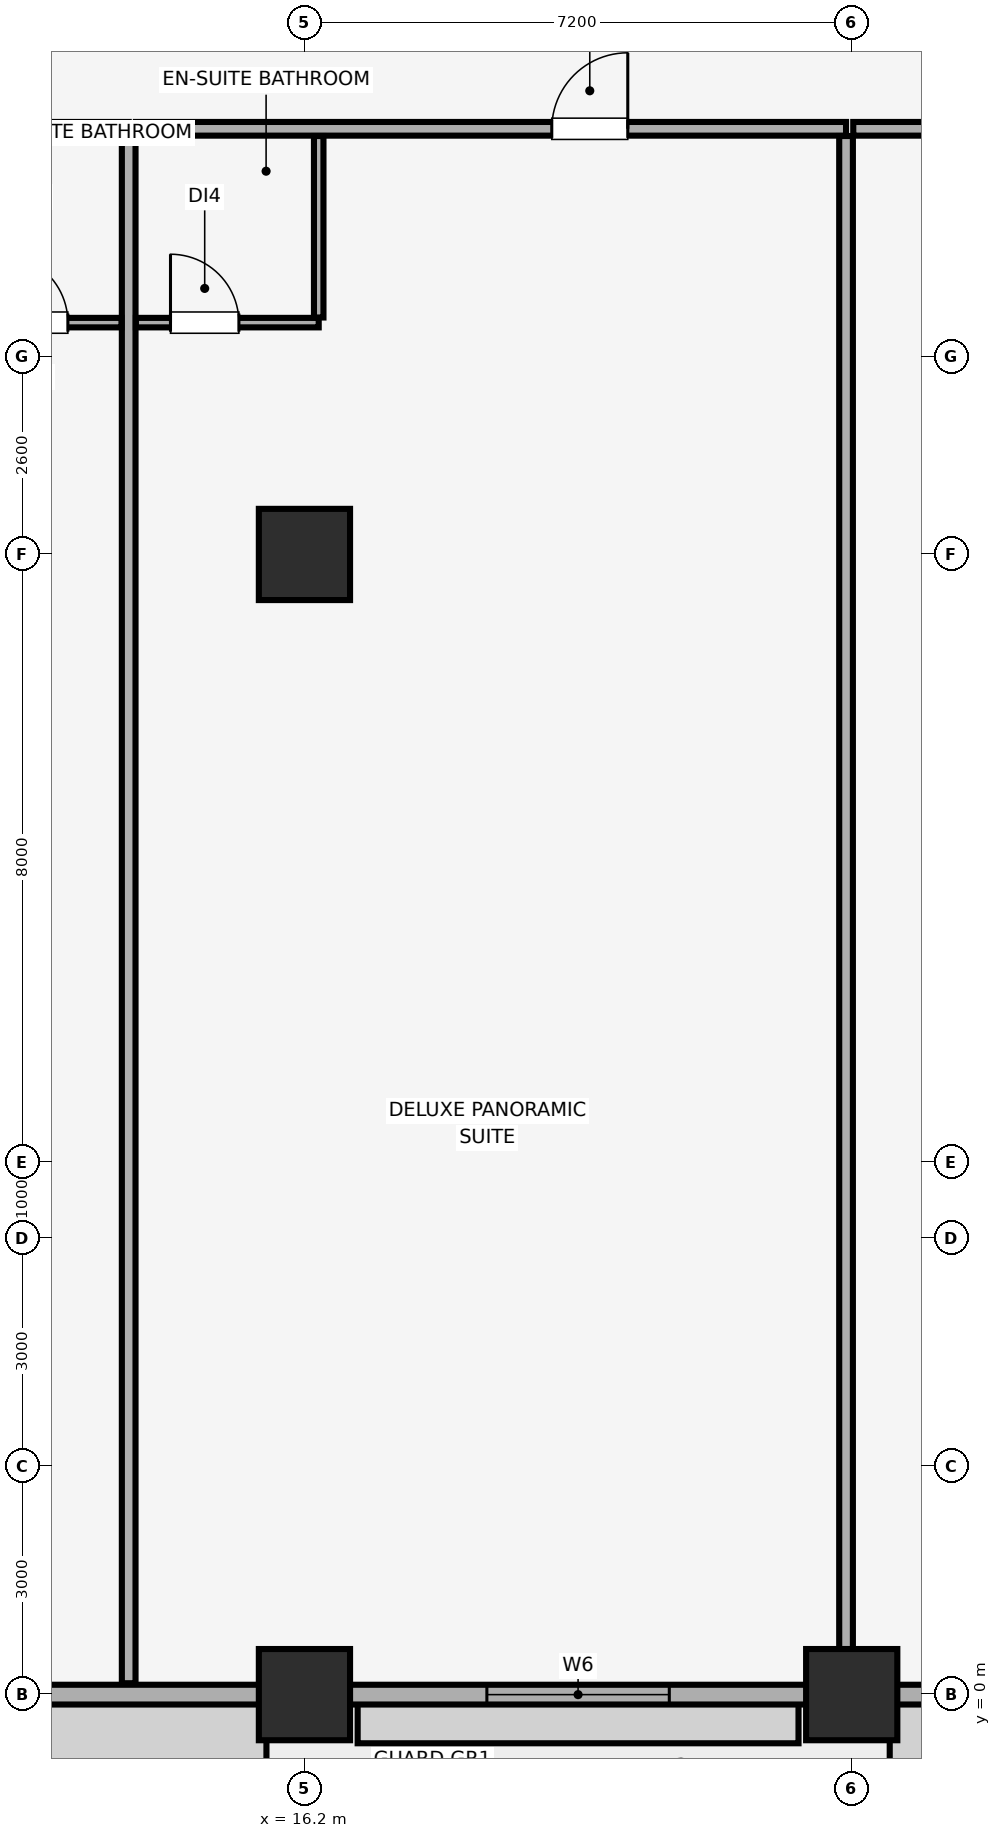
"""IFC4 building model, lengths in metres.
Left out: names, types, materials, properties, quantities, classifications, styles, units other than length and angle.
Written with IfcOpenShell. Run it as: python <this file> out.ifc"""

import sys

from ifc_helpers import new_model, si_unit, direction, frame, frame_2d, origin, origin_2d, place, context, subcontext, project, spatial, rectangle, extrude, element, fill, save


model = new_model("IFC4")
c1 = context("Model", 3, precision=1e-05, world=origin(), true_north=direction((0.0, 1.0)))
c2 = subcontext(c1, "Body", "Model", "MODEL_VIEW")
j1 = project(units=[si_unit("LENGTHUNIT", "METRE"), si_unit("PLANEANGLEUNIT", "RADIAN")], contexts=[c1])
p1 = place(None, origin())
s1 = spatial("IfcSite", under=j1, at=p1, CompositionType="ELEMENT")
p2 = place(p1, origin())
s2 = spatial("IfcBuilding", under=s1, at=p2, CompositionType="ELEMENT")
p3 = place(p2, frame((0.0, 0.0, 93.05)))
s3 = spatial("IfcBuildingStorey", under=s2, at=p3, CompositionType="ELEMENT", Elevation=93.05)
for number, where, z_axis, x_axis in (
    (1, (16.2, 0.0, 0.0), (0.0, 0.0, 1.0), (1.0, 0.0, 0.0)),
    (2, (23.4, 0.0, 0.0), (0.0, 0.0, 1.0), (1.0, 0.0, 0.0)),
    (3, (16.2, 15.0, 0.0), (0.0, 0.0, 1.0), (1.0, 0.0, 0.0)),
):
    element("IfcColumn", number, at=place(p3, frame(where, z_axis=z_axis, x_axis=x_axis)), inside=s3, PredefinedType="COLUMN", context=c2, shape_type="SweptSolid", body=[
        extrude(rectangle(XDim=1.2, YDim=1.2, at=origin_2d()), origin(), (0.0, 0.0, 1.0), 3.51),
    ])
p4 = place(p3, frame((4.2, 0.0, 0.0), z_axis=(0.0, 0.0, 1.0), x_axis=(1.0, 0.0, 0.0)))
e4 = element("IfcWall", 4, at=p4, inside=s3, PredefinedType="SOLIDWALL", context=c2, shape_type="SweptSolid", body=[
    extrude(rectangle(XDim=75.6, YDim=0.26, at=frame_2d((37.8, 0.0))), origin(), (0.0, 0.0, 1.0), 2.56),
])
p5 = place(p4, frame((21.383, 0.0, 0.0)))
e5 = element("IfcOpeningElement", 5, at=p5, cuts=e4, PredefinedType="OPENING", context=c2, shape_type="SweptSolid", body=[
    extrude(rectangle(XDim=1.1, YDim=2.15, at=frame_2d((0.55, 1.075))), frame((0.0, 0.14, 0.0), z_axis=(0.0, -1.0, 0.0), x_axis=(1.0, 0.0, 0.0)), (0.0, 0.0, 1.0), 0.28),
])
p6 = place(p4, frame((36.05, 0.0, 0.0)))
e6 = element("IfcOpeningElement", 6, at=p6, cuts=e4, PredefinedType="OPENING", context=c2, shape_type="SweptSolid", body=[
    extrude(rectangle(XDim=1.1, YDim=2.15, at=frame_2d((0.55, 1.075))), frame((0.0, 0.14, 0.0), z_axis=(0.0, -1.0, 0.0), x_axis=(1.0, 0.0, 0.0)), (0.0, 0.0, 1.0), 0.28),
])
p7 = place(p4, frame((53.117, 0.0, 0.0)))
e7 = element("IfcOpeningElement", 7, at=p7, cuts=e4, PredefinedType="OPENING", context=c2, shape_type="SweptSolid", body=[
    extrude(rectangle(XDim=1.1, YDim=2.15, at=frame_2d((0.55, 1.075))), frame((0.0, 0.14, 0.0), z_axis=(0.0, -1.0, 0.0), x_axis=(1.0, 0.0, 0.0)), (0.0, 0.0, 1.0), 0.28),
])
p8 = place(p4, frame((1.035, 0.0, 0.85)))
e8 = element("IfcOpeningElement", 8, at=p8, cuts=e4, PredefinedType="OPENING", context=c2, shape_type="SweptSolid", body=[
    extrude(rectangle(XDim=2.4, YDim=1.5, at=frame_2d((1.2, 0.75))), frame((0.0, 0.14, 0.0), z_axis=(0.0, -1.0, 0.0), x_axis=(1.0, 0.0, 0.0)), (0.0, 0.0, 1.0), 0.28),
])
p9 = place(p4, frame((6.244, 0.0, 0.85)))
e9 = element("IfcOpeningElement", 9, at=p9, cuts=e4, PredefinedType="OPENING", context=c2, shape_type="SweptSolid", body=[
    extrude(rectangle(XDim=2.4, YDim=1.5, at=frame_2d((1.2, 0.75))), frame((0.0, 0.14, 0.0), z_axis=(0.0, -1.0, 0.0), x_axis=(1.0, 0.0, 0.0)), (0.0, 0.0, 1.0), 0.28),
])
p10 = place(p4, frame((14.4, 0.0, 0.85)))
e10 = element("IfcOpeningElement", 10, at=p10, cuts=e4, PredefinedType="OPENING", context=c2, shape_type="SweptSolid", body=[
    extrude(rectangle(XDim=2.4, YDim=1.5, at=frame_2d((1.2, 0.75))), frame((0.0, 0.14, 0.0), z_axis=(0.0, -1.0, 0.0), x_axis=(1.0, 0.0, 0.0)), (0.0, 0.0, 1.0), 0.28),
])
p11 = place(p4, frame((23.127, 0.0, 0.85)))
e11 = element("IfcOpeningElement", 11, at=p11, cuts=e4, PredefinedType="OPENING", context=c2, shape_type="SweptSolid", body=[
    extrude(rectangle(XDim=2.4, YDim=1.5, at=frame_2d((1.2, 0.75))), frame((0.0, 0.14, 0.0), z_axis=(0.0, -1.0, 0.0), x_axis=(1.0, 0.0, 0.0)), (0.0, 0.0, 1.0), 0.28),
])
p12 = place(p4, frame((29.681, 0.0, 0.85)))
e12 = element("IfcOpeningElement", 12, at=p12, cuts=e4, PredefinedType="OPENING", context=c2, shape_type="SweptSolid", body=[
    extrude(rectangle(XDim=2.4, YDim=1.5, at=frame_2d((1.2, 0.75))), frame((0.0, 0.14, 0.0), z_axis=(0.0, -1.0, 0.0), x_axis=(1.0, 0.0, 0.0)), (0.0, 0.0, 1.0), 0.28),
])
p13 = place(p4, frame((38.601, 0.0, 0.85)))
e13 = element("IfcOpeningElement", 13, at=p13, cuts=e4, PredefinedType="OPENING", context=c2, shape_type="SweptSolid", body=[
    extrude(rectangle(XDim=2.4, YDim=1.5, at=frame_2d((1.2, 0.75))), frame((0.0, 0.14, 0.0), z_axis=(0.0, -1.0, 0.0), x_axis=(1.0, 0.0, 0.0)), (0.0, 0.0, 1.0), 0.28),
])
p14 = place(p4, frame((43.719, 0.0, 0.85)))
e14 = element("IfcOpeningElement", 14, at=p14, cuts=e4, PredefinedType="OPENING", context=c2, shape_type="SweptSolid", body=[
    extrude(rectangle(XDim=2.4, YDim=1.5, at=frame_2d((1.2, 0.75))), frame((0.0, 0.14, 0.0), z_axis=(0.0, -1.0, 0.0), x_axis=(1.0, 0.0, 0.0)), (0.0, 0.0, 1.0), 0.28),
])
p15 = place(p4, frame((50.073, 0.0, 0.85)))
e15 = element("IfcOpeningElement", 15, at=p15, cuts=e4, PredefinedType="OPENING", context=c2, shape_type="SweptSolid", body=[
    extrude(rectangle(XDim=2.4, YDim=1.5, at=frame_2d((1.2, 0.75))), frame((0.0, 0.14, 0.0), z_axis=(0.0, -1.0, 0.0), x_axis=(1.0, 0.0, 0.0)), (0.0, 0.0, 1.0), 0.28),
])
p16 = place(p4, frame((58.838, 0.0, 0.85)))
e16 = element("IfcOpeningElement", 16, at=p16, cuts=e4, PredefinedType="OPENING", context=c2, shape_type="SweptSolid", body=[
    extrude(rectangle(XDim=2.4, YDim=1.5, at=frame_2d((1.2, 0.75))), frame((0.0, 0.14, 0.0), z_axis=(0.0, -1.0, 0.0), x_axis=(1.0, 0.0, 0.0)), (0.0, 0.0, 1.0), 0.28),
])
p17 = place(p4, frame((67.056, 0.0, 0.85)))
e17 = element("IfcOpeningElement", 17, at=p17, cuts=e4, PredefinedType="OPENING", context=c2, shape_type="SweptSolid", body=[
    extrude(rectangle(XDim=2.4, YDim=1.5, at=frame_2d((1.2, 0.75))), frame((0.0, 0.14, 0.0), z_axis=(0.0, -1.0, 0.0), x_axis=(1.0, 0.0, 0.0)), (0.0, 0.0, 1.0), 0.28),
])
p18 = place(p4, frame((72.165, 0.0, 0.85)))
e18 = element("IfcOpeningElement", 18, at=p18, cuts=e4, PredefinedType="OPENING", context=c2, shape_type="SweptSolid", body=[
    extrude(rectangle(XDim=2.4, YDim=1.5, at=frame_2d((1.2, 0.75))), frame((0.0, 0.14, 0.0), z_axis=(0.0, -1.0, 0.0), x_axis=(1.0, 0.0, 0.0)), (0.0, 0.0, 1.0), 0.28),
])
p19 = place(p3, frame((0.15, 20.6, 0.0), z_axis=(0.0, 0.0, 1.0), x_axis=(1.0, 0.0, 0.0)))
e19 = element("IfcWall", 19, at=p19, inside=s3, PredefinedType="PARTITIONING", context=c2, shape_type="SweptSolid", body=[
    extrude(rectangle(XDim=13.738, YDim=0.18, at=frame_2d((6.869, 0.0))), origin(), (0.0, 0.0, 1.0), 3.51),
])
p20 = place(p19, frame((5.685, 0.0, 0.0)))
e20 = element("IfcOpeningElement", 20, at=p20, cuts=e19, PredefinedType="OPENING", context=c2, shape_type="SweptSolid", body=[
    extrude(rectangle(XDim=1.0, YDim=2.15, at=frame_2d((0.5, 1.075))), frame((0.0, 0.1, 0.0), z_axis=(0.0, -1.0, 0.0), x_axis=(1.0, 0.0, 0.0)), (0.0, 0.0, 1.0), 0.2),
])
p21 = place(p3, frame((13.888, 0.15, 0.0), z_axis=(0.0, 0.0, 1.0), x_axis=(0.0, 1.0, 0.0)))
e21 = element("IfcWall", 21, at=p21, inside=s3, PredefinedType="PARTITIONING", context=c2, shape_type="SweptSolid", body=[
    extrude(rectangle(XDim=20.355, YDim=0.18, at=frame_2d((10.177, 0.0))), origin(), (0.0, 0.0, 1.0), 3.51),
])
p22 = place(p3, frame((11.388, 18.05, 0.0), z_axis=(0.0, 0.0, 1.0), x_axis=(1.0, 0.0, 0.0)))
e22 = element("IfcWall", 22, at=p22, inside=s3, PredefinedType="PARTITIONING", context=c2, shape_type="SweptSolid", body=[
    extrude(rectangle(XDim=2.405, YDim=0.125, at=frame_2d((1.203, 0.0))), origin(), (0.0, 0.0, 1.0), 3.51),
])
p23 = place(p22, frame((0.8, 0.0, 0.0)))
e23 = element("IfcOpeningElement", 23, at=p23, cuts=e22, PredefinedType="OPENING", context=c2, shape_type="SweptSolid", body=[
    extrude(rectangle(XDim=0.9, YDim=2.1, at=frame_2d((0.45, 1.05))), frame((0.0, 0.073, 0.0), z_axis=(0.0, -1.0, 0.0), x_axis=(1.0, 0.0, 0.0)), (0.0, 0.0, 1.0), 0.145),
])
p24 = place(p3, frame((13.983, 20.6, 0.0), z_axis=(0.0, 0.0, 1.0), x_axis=(1.0, 0.0, 0.0)))
e24 = element("IfcWall", 24, at=p24, inside=s3, PredefinedType="PARTITIONING", context=c2, shape_type="SweptSolid", body=[
    extrude(rectangle(XDim=9.343, YDim=0.18, at=frame_2d((4.671, 0.0))), origin(), (0.0, 0.0, 1.0), 3.51),
])
p25 = place(p24, frame((5.471, 0.0, 0.0)))
e25 = element("IfcOpeningElement", 25, at=p25, cuts=e24, PredefinedType="OPENING", context=c2, shape_type="SweptSolid", body=[
    extrude(rectangle(XDim=1.0, YDim=2.15, at=frame_2d((0.5, 1.075))), frame((0.0, 0.1, 0.0), z_axis=(0.0, -1.0, 0.0), x_axis=(1.0, 0.0, 0.0)), (0.0, 0.0, 1.0), 0.2),
])
p26 = place(p3, frame((23.325, 0.15, 0.0), z_axis=(0.0, 0.0, 1.0), x_axis=(0.0, 1.0, 0.0)))
e26 = element("IfcWall", 26, at=p26, inside=s3, PredefinedType="PARTITIONING", context=c2, shape_type="SweptSolid", body=[
    extrude(rectangle(XDim=20.355, YDim=0.18, at=frame_2d((10.177, 0.0))), origin(), (0.0, 0.0, 1.0), 2.898),
])
p27 = place(p3, frame((13.983, 18.05, 0.0), z_axis=(0.0, 0.0, 1.0), x_axis=(1.0, 0.0, 0.0)))
e27 = element("IfcWall", 27, at=p27, inside=s3, PredefinedType="PARTITIONING", context=c2, shape_type="SweptSolid", body=[
    extrude(rectangle(XDim=2.405, YDim=0.125, at=frame_2d((1.203, 0.0))), origin(), (0.0, 0.0, 1.0), 3.51),
])
p28 = place(p27, frame((0.455, 0.0, 0.0)))
e28 = element("IfcOpeningElement", 28, at=p28, cuts=e27, PredefinedType="OPENING", context=c2, shape_type="SweptSolid", body=[
    extrude(rectangle(XDim=0.9, YDim=2.1, at=frame_2d((0.45, 1.05))), frame((0.0, 0.073, 0.0), z_axis=(0.0, -1.0, 0.0), x_axis=(1.0, 0.0, 0.0)), (0.0, 0.0, 1.0), 0.145),
])
p29 = place(p3, frame((16.388, 18.117, 0.0), z_axis=(0.0, 0.0, 1.0), x_axis=(0.0, 1.0, 0.0)))
e29 = element("IfcWall", 29, at=p29, inside=s3, PredefinedType="PARTITIONING", context=c2, shape_type="SweptSolid", body=[
    extrude(rectangle(XDim=2.387, YDim=0.125, at=frame_2d((1.194, 0.0))), origin(), (0.0, 0.0, 1.0), 2.977),
])
p30 = place(p3, frame((23.42, 20.6, 0.0), z_axis=(0.0, 0.0, 1.0), x_axis=(1.0, 0.0, 0.0)))
e30 = element("IfcWall", 30, at=p30, inside=s3, PredefinedType="PARTITIONING", context=c2, shape_type="SweptSolid", body=[
    extrude(rectangle(XDim=9.343, YDim=0.18, at=frame_2d((4.671, 0.0))), origin(), (0.0, 0.0, 1.0), 3.51),
])
p31 = place(p30, frame((2.851, 0.0, 0.0)))
e31 = element("IfcOpeningElement", 31, at=p31, cuts=e30, PredefinedType="OPENING", context=c2, shape_type="SweptSolid", body=[
    extrude(rectangle(XDim=1.0, YDim=2.15, at=frame_2d((0.5, 1.075))), frame((0.0, 0.1, 0.0), z_axis=(0.0, -1.0, 0.0), x_axis=(1.0, 0.0, 0.0)), (0.0, 0.0, 1.0), 0.2),
])
p32 = place(p10, origin())
e32 = element("IfcWindow", 32, at=p32, inside=s3, PartitioningType="SINGLE_PANEL", PredefinedType="WINDOW", context=c2, shape_type="SweptSolid", body=[
    extrude(rectangle(XDim=2.4, YDim=1.5, at=frame_2d((1.2, 0.75))), frame((0.0, 0.03, 0.0), z_axis=(0.0, -1.0, 0.0), x_axis=(1.0, 0.0, 0.0)), (0.0, 0.0, 1.0), 0.06),
])
fill(e10, e32)
p33 = place(p23, origin())
e33 = element("IfcDoor", 33, at=p33, inside=s3, OperationType="SINGLE_SWING_LEFT", PredefinedType="DOOR", context=c2, shape_type="SweptSolid", body=[
    extrude(rectangle(XDim=0.9, YDim=2.1, at=frame_2d((0.45, 1.05))), frame((0.0, 0.025, 0.0), z_axis=(0.0, -1.0, 0.0), x_axis=(1.0, 0.0, 0.0)), (0.0, 0.0, 1.0), 0.05),
])
fill(e23, e33)
p34 = place(p25, origin())
e34 = element("IfcDoor", 34, at=p34, inside=s3, OperationType="SINGLE_SWING_RIGHT", PredefinedType="DOOR", context=c2, shape_type="SweptSolid", body=[
    extrude(rectangle(XDim=1.0, YDim=2.15, at=frame_2d((0.5, 1.075))), frame((0.0, 0.025, 0.0), z_axis=(0.0, -1.0, 0.0), x_axis=(1.0, 0.0, 0.0)), (0.0, 0.0, 1.0), 0.05),
])
fill(e25, e34)
p35 = place(p28, origin())
e35 = element("IfcDoor", 35, at=p35, inside=s3, OperationType="SINGLE_SWING_LEFT", PredefinedType="DOOR", context=c2, shape_type="SweptSolid", body=[
    extrude(rectangle(XDim=0.9, YDim=2.1, at=frame_2d((0.45, 1.05))), frame((0.0, 0.025, 0.0), z_axis=(0.0, -1.0, 0.0), x_axis=(1.0, 0.0, 0.0)), (0.0, 0.0, 1.0), 0.05),
])
fill(e28, e35)
save(model, sys.argv[1])
